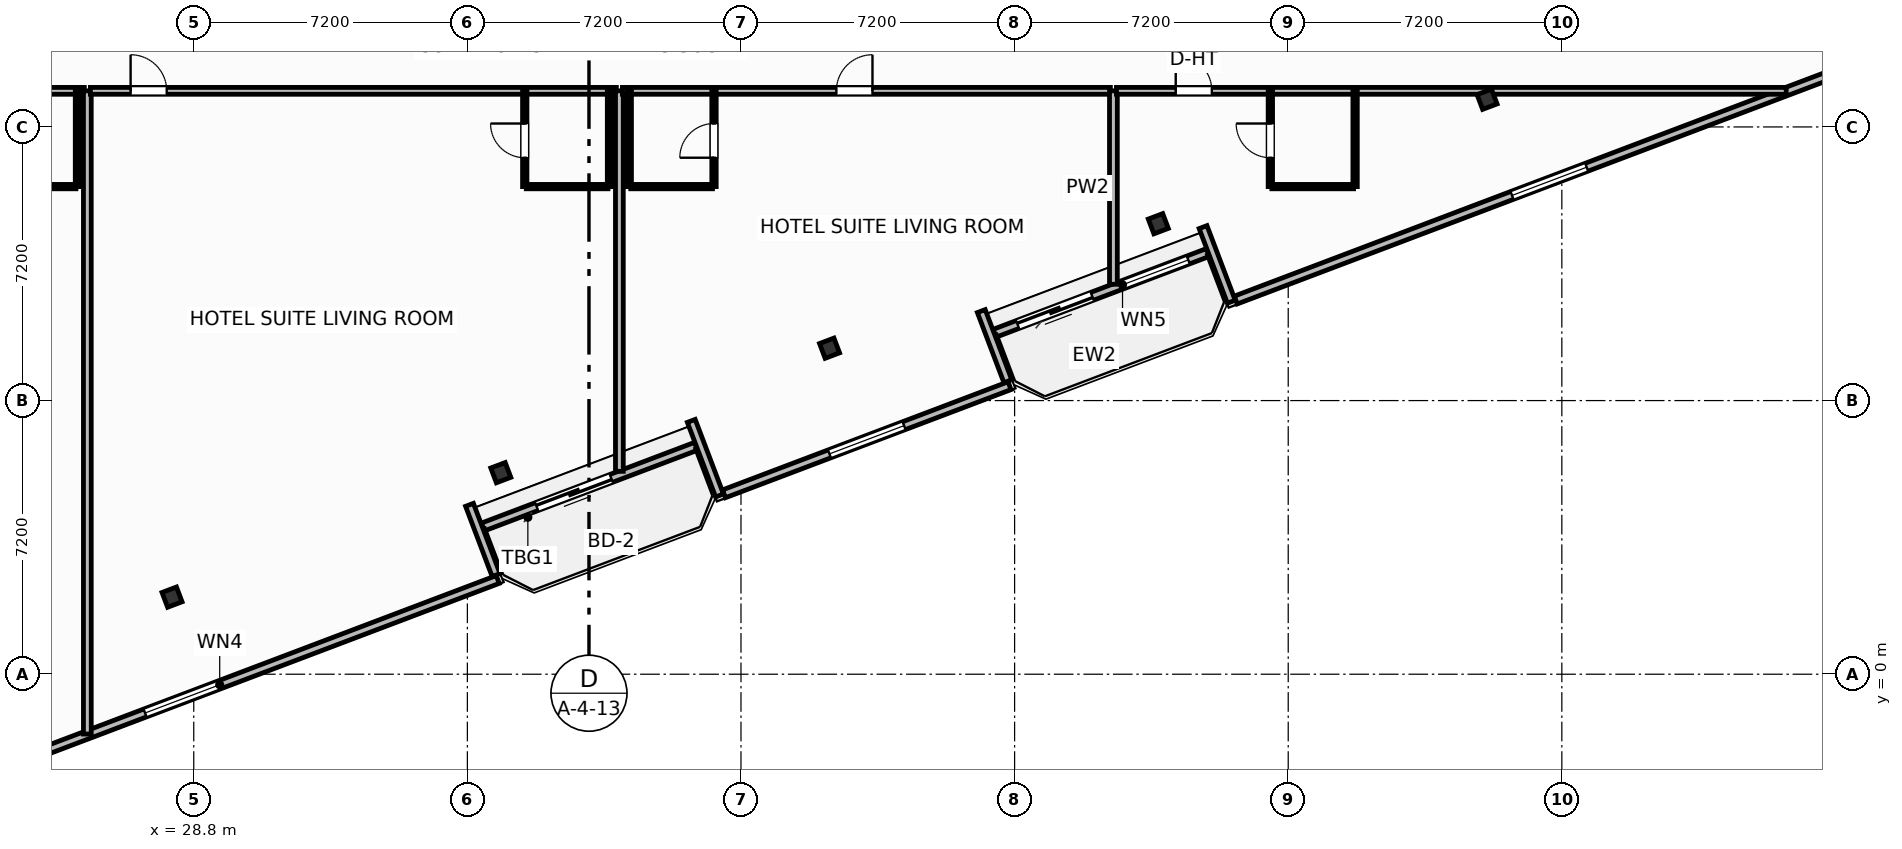
"""IFC4 building model, lengths in metres.
Left out: names, types, materials, properties, quantities, classifications, styles, units other than length and angle.
Written with IfcOpenShell. Run it as: python <this file> out.ifc"""

import sys

from ifc_helpers import new_model, si_unit, direction, frame, frame_2d, origin, origin_2d, place, context, subcontext, project, spatial, rectangle, i_section, extrude, element, fill, save


model = new_model("IFC4")
c1 = context("Model", 3, precision=1e-05, world=origin(), true_north=direction((0.0, 1.0)))
c2 = subcontext(c1, "Body", "Model", "MODEL_VIEW")
j1 = project(units=[si_unit("LENGTHUNIT", "METRE"), si_unit("PLANEANGLEUNIT", "RADIAN")], contexts=[c1])
p1 = place(None, origin())
s1 = spatial("IfcSite", under=j1, at=p1, CompositionType="ELEMENT")
p2 = place(p1, origin())
s2 = spatial("IfcBuilding", under=s1, at=p2, CompositionType="ELEMENT")
p3 = place(p2, frame((0.0, 0.0, 249.7)))
s3 = spatial("IfcBuildingStorey", under=s2, at=p3, CompositionType="ELEMENT", Elevation=249.7)
for number, where, z_axis, x_axis in (
    (1, (28.229, 2.028, 0.0), (0.0, 0.0, 1.0), (0.935, 0.354, 0.0)),
    (2, (36.88, 5.303, 0.0), (0.0, 0.0, 1.0), (0.935, 0.354, 0.0)),
    (3, (45.531, 8.578, 0.0), (0.0, 0.0, 1.0), (0.935, 0.354, 0.0)),
    (4, (54.181, 11.853, 0.0), (0.0, 0.0, 1.0), (0.935, 0.354, 0.0)),
    (5, (62.832, 15.128, 0.0), (0.0, 0.0, 1.0), (0.935, 0.354, 0.0)),
):
    element("IfcColumn", number, at=place(p3, frame(where, z_axis=z_axis, x_axis=x_axis)), inside=s3, PredefinedType="COLUMN", context=c2, shape_type="SweptSolid", body=[
        extrude(i_section(OverallWidth=0.406, OverallDepth=0.416, WebThickness=0.03, FlangeThickness=0.048, FilletRadius=0.025, at=origin_2d()), origin(), (0.0, 0.0, 1.0), 3.7),
    ])
p4 = place(p3, frame((42.017, 5.997, 0.0), z_axis=(0.0, 0.0, 1.0), x_axis=(-0.9352192676, -0.354069091436, 0.0)))
e6 = element("IfcWall", 6, at=p4, inside=s3, PredefinedType="SOLIDWALL", context=c2, shape_type="SweptSolid", body=[
    extrude(rectangle(XDim=6.0, YDim=0.22, at=frame_2d((3.0, 0.0))), origin(), (0.0, 0.0, 1.0), 2.66),
])
p5 = place(p4, frame((2.384, 0.0, 0.0)))
e7 = element("IfcOpeningElement", 7, at=p5, cuts=e6, PredefinedType="OPENING", context=c2, shape_type="SweptSolid", body=[
    extrude(rectangle(XDim=2.1, YDim=2.3, at=frame_2d((1.05, 1.15))), frame((0.0, 0.12, 0.0), z_axis=(0.0, -1.0, 0.0), x_axis=(1.0, 0.0, 0.0)), (0.0, 0.0, 1.0), 0.24),
])
p6 = place(p3, frame((55.484, 11.095, 0.0), z_axis=(0.0, 0.0, 1.0), x_axis=(-0.935227640088, -0.354046976001, 0.0)))
e8 = element("IfcWall", 8, at=p6, inside=s3, PredefinedType="SOLIDWALL", context=c2, shape_type="SweptSolid", body=[
    extrude(rectangle(XDim=6.0, YDim=0.22, at=frame_2d((3.0, 0.0))), origin(), (0.0, 0.0, 1.0), 2.66),
])
p7 = place(p6, frame((3.252, 0.0, 0.0)))
e9 = element("IfcOpeningElement", 9, at=p7, cuts=e8, PredefinedType="OPENING", context=c2, shape_type="SweptSolid", body=[
    extrude(rectangle(XDim=2.1, YDim=2.3, at=frame_2d((1.05, 1.15))), frame((0.0, 0.12, 0.0), z_axis=(0.0, -1.0, 0.0), x_axis=(1.0, 0.0, 0.0)), (0.0, 0.0, 1.0), 0.24),
])
p8 = place(p6, frame((0.55, 0.0, 0.75)))
e10 = element("IfcOpeningElement", 10, at=p8, cuts=e8, PredefinedType="OPENING", context=c2, shape_type="SweptSolid", body=[
    extrude(rectangle(XDim=1.85, YDim=1.75, at=frame_2d((0.925, 0.875))), frame((0.0, 0.12, 0.0), z_axis=(0.0, -1.0, 0.0), x_axis=(1.0, 0.0, 0.0)), (0.0, 0.0, 1.0), 0.24),
])
p9 = place(p3, frame((20.202, -3.791, 0.0), z_axis=(0.0, 0.0, 1.0), x_axis=(0.935225574232, 0.354052432984, 0.0)))
e11 = element("IfcWall", 11, at=p9, inside=s3, PredefinedType="SOLIDWALL", context=c2, shape_type="SweptSolid", body=[
    extrude(rectangle(XDim=17.747, YDim=0.22, at=frame_2d((8.874, 0.0))), origin(), (0.0, 0.0, 1.0), 2.66),
])
p10 = place(p9, frame((7.823, 0.0, 0.8)))
e12 = element("IfcOpeningElement", 12, at=p10, cuts=e11, PredefinedType="OPENING", context=c2, shape_type="SweptSolid", body=[
    extrude(rectangle(XDim=2.1, YDim=1.75, at=frame_2d((1.05, 0.875))), frame((0.0, 0.12, 0.0), z_axis=(0.0, -1.0, 0.0), x_axis=(1.0, 0.0, 0.0)), (0.0, 0.0, 1.0), 0.24),
])
p11 = place(p3, frame((36.755, 2.61, 0.0), z_axis=(0.0, 0.0, 1.0), x_axis=(-0.354020680661, 0.935237594232, 0.0)))
e13 = element("IfcWall", 13, at=p11, inside=s3, PredefinedType="SOLIDWALL", context=c2, shape_type="SweptSolid", body=[
    extrude(rectangle(XDim=1.975, YDim=0.22, at=frame_2d((0.988, 0.0))), origin(), (0.0, 0.0, 1.0), 2.66),
])
p12 = place(p3, frame((41.892, 6.666, 0.0), z_axis=(0.0, 0.0, 1.0), x_axis=(0.354128469405, -0.935196785258, 0.0)))
e14 = element("IfcWall", 14, at=p12, inside=s3, PredefinedType="SOLIDWALL", context=c2, shape_type="SweptSolid", body=[
    extrude(rectangle(XDim=2.1, YDim=0.22, at=frame_2d((1.05, 0.0))), origin(), (0.0, 0.0, 1.0), 2.66),
])
p13 = place(p3, frame((42.752, 4.746, 0.0), z_axis=(0.0, 0.0, 1.0), x_axis=(0.935216926991, 0.354075273733, 0.0)))
e15 = element("IfcWall", 15, at=p13, inside=s3, PredefinedType="SOLIDWALL", context=c2, shape_type="SweptSolid", body=[
    extrude(rectangle(XDim=8.035, YDim=0.22, at=frame_2d((4.018, 0.0))), origin(), (0.0, 0.0, 1.0), 2.66),
])
p14 = place(p13, frame((2.968, 0.0, 0.8)))
e16 = element("IfcOpeningElement", 16, at=p14, cuts=e15, PredefinedType="OPENING", context=c2, shape_type="SweptSolid", body=[
    extrude(rectangle(XDim=2.1, YDim=1.75, at=frame_2d((1.05, 0.875))), frame((0.0, 0.12, 0.0), z_axis=(0.0, -1.0, 0.0), x_axis=(1.0, 0.0, 0.0)), (0.0, 0.0, 1.0), 0.24),
])
p15 = place(p3, frame((50.223, 7.708, 0.0), z_axis=(0.0, 0.0, 1.0), x_axis=(-0.354020680661, 0.935237594232, 0.0)))
e17 = element("IfcWall", 17, at=p15, inside=s3, PredefinedType="SOLIDWALL", context=c2, shape_type="SweptSolid", body=[
    extrude(rectangle(XDim=1.975, YDim=0.22, at=frame_2d((0.988, 0.0))), origin(), (0.0, 0.0, 1.0), 2.66),
])
p16 = place(p3, frame((55.359, 11.764, 0.0), z_axis=(0.0, 0.0, 1.0), x_axis=(0.354026782794, -0.935235284334, 0.0)))
e18 = element("IfcWall", 18, at=p16, inside=s3, PredefinedType="SOLIDWALL", context=c2, shape_type="SweptSolid", body=[
    extrude(rectangle(XDim=2.1, YDim=0.22, at=frame_2d((1.05, 0.0))), origin(), (0.0, 0.0, 1.0), 2.66),
])
p17 = place(p3, frame((56.219, 9.845, 0.0), z_axis=(0.0, 0.0, 1.0), x_axis=(0.935225601791, 0.354052360188, 0.0)))
e19 = element("IfcWall", 19, at=p17, inside=s3, PredefinedType="SOLIDWALL", context=c2, shape_type="SweptSolid", body=[
    extrude(rectangle(XDim=17.647, YDim=0.22, at=frame_2d((8.824, 0.0))), origin(), (0.0, 0.0, 1.0), 2.66),
])
p18 = place(p17, frame((7.774, 0.0, 0.8)))
e20 = element("IfcOpeningElement", 20, at=p18, cuts=e19, PredefinedType="OPENING", context=c2, shape_type="SweptSolid", body=[
    extrude(rectangle(XDim=2.1, YDim=1.75, at=frame_2d((1.05, 0.875))), frame((0.0, 0.12, 0.0), z_axis=(0.0, -1.0, 0.0), x_axis=(1.0, 0.0, 0.0)), (0.0, 0.0, 1.0), 0.24),
])
p19 = place(p3, frame((7.764, 15.35, 0.0), z_axis=(0.0, 0.0, 1.0), x_axis=(1.0, 0.0, 0.0)))
e21 = element("IfcWall", 21, at=p19, inside=s3, PredefinedType="PARTITIONING", context=c2, shape_type="SweptSolid", body=[
    extrude(rectangle(XDim=18.156, YDim=0.18, at=frame_2d((9.078, 0.0))), origin(), (0.0, 0.0, 1.0), 3.38),
])
p20 = place(p19, frame((11.617, 0.0, 0.0)))
e22 = element("IfcOpeningElement", 22, at=p20, cuts=e21, PredefinedType="OPENING", context=c2, shape_type="SweptSolid", body=[
    extrude(rectangle(XDim=0.95, YDim=2.15, at=frame_2d((0.475, 1.075))), frame((0.0, 0.1, 0.0), z_axis=(0.0, -1.0, 0.0), x_axis=(1.0, 0.0, 0.0)), (0.0, 0.0, 1.0), 0.2),
])
p21 = place(p3, frame((23.55, 12.83, 0.0), z_axis=(0.0, 0.0, 1.0), x_axis=(1.0, 0.0, 0.0)))
e23 = element("IfcWall", 23, at=p21, inside=s3, PredefinedType="PARTITIONING", context=c2, shape_type="SweptSolid", body=[
    extrude(rectangle(XDim=2.15, YDim=0.115, at=frame_2d((1.075, 0.0))), origin(), (0.0, 0.0, 1.0), 3.38),
])
p22 = place(p3, frame((25.74, 12.83, 0.0), z_axis=(0.0, 0.0, 1.0), x_axis=(0.0, 1.0, 0.0)))
e24 = element("IfcWall", 24, at=p22, inside=s3, PredefinedType="PARTITIONING", context=c2, shape_type="SweptSolid", body=[
    extrude(rectangle(XDim=2.52, YDim=0.115, at=frame_2d((1.26, 0.0))), origin(), (0.0, 0.0, 1.0), 1.165),
])
p23 = place(p3, frame((26.0, -1.574, 0.0), z_axis=(0.0, 0.0, 1.0), x_axis=(0.0, 1.0, 0.0)))
e25 = element("IfcWall", 25, at=p23, inside=s3, PredefinedType="PARTITIONING", context=c2, shape_type="SweptSolid", body=[
    extrude(rectangle(XDim=16.925, YDim=0.205, at=frame_2d((8.462, 0.0))), origin(), (0.0, 0.0, 1.0), 1.165),
])
p24 = place(p3, frame((26.08, 15.35, 0.0), z_axis=(0.0, 0.0, 1.0), x_axis=(1.0, 0.0, 0.0)))
e26 = element("IfcWall", 26, at=p24, inside=s3, PredefinedType="PARTITIONING", context=c2, shape_type="SweptSolid", body=[
    extrude(rectangle(XDim=13.84, YDim=0.18, at=frame_2d((6.92, 0.0))), origin(), (0.0, 0.0, 1.0), 3.38),
])
p25 = place(p24, frame((1.058, 0.0, 0.0)))
e27 = element("IfcOpeningElement", 27, at=p25, cuts=e26, PredefinedType="OPENING", context=c2, shape_type="SweptSolid", body=[
    extrude(rectangle(XDim=0.95, YDim=2.15, at=frame_2d((0.475, 1.075))), frame((0.0, 0.1, 0.0), z_axis=(0.0, -1.0, 0.0), x_axis=(1.0, 0.0, 0.0)), (0.0, 0.0, 1.0), 0.2),
])
p26 = place(p3, frame((37.55, 12.83, 0.0), z_axis=(0.0, 0.0, 1.0), x_axis=(1.0, 0.0, 0.0)))
e28 = element("IfcWall", 28, at=p26, inside=s3, PredefinedType="PARTITIONING", context=c2, shape_type="SweptSolid", body=[
    extrude(rectangle(XDim=2.15, YDim=0.115, at=frame_2d((1.075, 0.0))), origin(), (0.0, 0.0, 1.0), 3.38),
])
p27 = place(p3, frame((37.51, 12.83, 0.0), z_axis=(0.0, 0.0, 1.0), x_axis=(0.0, 1.0, 0.0)))
e29 = element("IfcWall", 29, at=p27, inside=s3, PredefinedType="PARTITIONING", context=c2, shape_type="SweptSolid", body=[
    extrude(rectangle(XDim=2.52, YDim=0.115, at=frame_2d((1.26, 0.0))), origin(), (0.0, 0.0, 1.0), 3.38),
])
p28 = place(p27, frame((0.76, 0.0, 0.0)))
e30 = element("IfcOpeningElement", 30, at=p28, cuts=e29, PredefinedType="OPENING", context=c2, shape_type="SweptSolid", body=[
    extrude(rectangle(XDim=0.9, YDim=2.05, at=frame_2d((0.45, 1.025))), frame((0.0, 0.067, 0.0), z_axis=(0.0, -1.0, 0.0), x_axis=(1.0, 0.0, 0.0)), (0.0, 0.0, 1.0), 0.135),
])
p29 = place(p3, frame((39.74, 12.83, 0.0), z_axis=(0.0, 0.0, 1.0), x_axis=(0.0, 1.0, 0.0)))
e31 = element("IfcWall", 31, at=p29, inside=s3, PredefinedType="PARTITIONING", context=c2, shape_type="SweptSolid", body=[
    extrude(rectangle(XDim=2.52, YDim=0.115, at=frame_2d((1.26, 0.0))), origin(), (0.0, 0.0, 1.0), 3.38),
])
p30 = place(p3, frame((40.0, 5.338, 0.0), z_axis=(0.0, 0.0, 1.0), x_axis=(0.0, 1.0, 0.0)))
e32 = element("IfcWall", 32, at=p30, inside=s3, PredefinedType="PARTITIONING", context=c2, shape_type="SweptSolid", body=[
    extrude(rectangle(XDim=10.012, YDim=0.205, at=frame_2d((5.006, 0.0))), origin(), (0.0, 0.0, 1.0), 3.38),
])
p31 = place(p3, frame((40.08, 15.35, 0.0), z_axis=(0.0, 0.0, 1.0), x_axis=(1.0, 0.0, 0.0)))
e33 = element("IfcWall", 33, at=p31, inside=s3, PredefinedType="PARTITIONING", context=c2, shape_type="SweptSolid", body=[
    extrude(rectangle(XDim=12.84, YDim=0.18, at=frame_2d((6.42, 0.0))), origin(), (0.0, 0.0, 1.0), 3.38),
])
p32 = place(p31, frame((5.63, 0.0, 0.0)))
e34 = element("IfcOpeningElement", 34, at=p32, cuts=e33, PredefinedType="OPENING", context=c2, shape_type="SweptSolid", body=[
    extrude(rectangle(XDim=0.95, YDim=2.15, at=frame_2d((0.475, 1.075))), frame((0.0, 0.1, 0.0), z_axis=(0.0, -1.0, 0.0), x_axis=(1.0, 0.0, 0.0)), (0.0, 0.0, 1.0), 0.2),
])
p33 = place(p3, frame((40.3, 12.83, 0.0), z_axis=(0.0, 0.0, 1.0), x_axis=(1.0, 0.0, 0.0)))
e35 = element("IfcWall", 35, at=p33, inside=s3, PredefinedType="PARTITIONING", context=c2, shape_type="SweptSolid", body=[
    extrude(rectangle(XDim=2.15, YDim=0.115, at=frame_2d((1.075, 0.0))), origin(), (0.0, 0.0, 1.0), 3.38),
])
p34 = place(p3, frame((42.49, 12.83, 0.0), z_axis=(0.0, 0.0, 1.0), x_axis=(0.0, 1.0, 0.0)))
e36 = element("IfcWall", 36, at=p34, inside=s3, PredefinedType="PARTITIONING", context=c2, shape_type="SweptSolid", body=[
    extrude(rectangle(XDim=2.52, YDim=0.115, at=frame_2d((1.26, 0.0))), origin(), (0.0, 0.0, 1.0), 3.38),
])
p35 = place(p34, frame((0.76, 0.0, 0.0)))
e37 = element("IfcOpeningElement", 37, at=p35, cuts=e36, PredefinedType="OPENING", context=c2, shape_type="SweptSolid", body=[
    extrude(rectangle(XDim=0.9, YDim=2.05, at=frame_2d((0.45, 1.025))), frame((0.0, 0.067, 0.0), z_axis=(0.0, -1.0, 0.0), x_axis=(1.0, 0.0, 0.0)), (0.0, 0.0, 1.0), 0.135),
])
p36 = place(p3, frame((40.26, 12.83, 0.0), z_axis=(0.0, 0.0, 1.0), x_axis=(0.0, 1.0, 0.0)))
e38 = element("IfcWall", 38, at=p36, inside=s3, PredefinedType="PARTITIONING", context=c2, shape_type="SweptSolid", body=[
    extrude(rectangle(XDim=2.52, YDim=0.115, at=frame_2d((1.26, 0.0))), origin(), (0.0, 0.0, 1.0), 3.38),
])
p37 = place(p3, frame((53.0, 10.26, 0.0), z_axis=(0.0, 0.0, 1.0), x_axis=(0.0, 1.0, 0.0)))
e39 = element("IfcWall", 39, at=p37, inside=s3, PredefinedType="PARTITIONING", context=c2, shape_type="SweptSolid", body=[
    extrude(rectangle(XDim=5.09, YDim=0.205, at=frame_2d((2.545, 0.0))), origin(), (0.0, 0.0, 1.0), 3.38),
])
p38 = place(p3, frame((53.08, 15.35, 0.0), z_axis=(0.0, 0.0, 1.0), x_axis=(1.0, 0.0, 0.0)))
e40 = element("IfcWall", 40, at=p38, inside=s3, PredefinedType="PARTITIONING", context=c2, shape_type="SweptSolid", body=[
    extrude(rectangle(XDim=17.624, YDim=0.18, at=frame_2d((8.812, 0.0))), origin(), (0.0, 0.0, 1.0), 3.38),
])
p39 = place(p38, frame((1.56, 0.0, 0.0)))
e41 = element("IfcOpeningElement", 41, at=p39, cuts=e40, PredefinedType="OPENING", context=c2, shape_type="SweptSolid", body=[
    extrude(rectangle(XDim=0.95, YDim=2.15, at=frame_2d((0.475, 1.075))), frame((0.0, 0.1, 0.0), z_axis=(0.0, -1.0, 0.0), x_axis=(1.0, 0.0, 0.0)), (0.0, 0.0, 1.0), 0.2),
])
p40 = place(p3, frame((57.17, 12.83, 0.0), z_axis=(0.0, 0.0, 1.0), x_axis=(1.0, 0.0, 0.0)))
e42 = element("IfcWall", 42, at=p40, inside=s3, PredefinedType="PARTITIONING", context=c2, shape_type="SweptSolid", body=[
    extrude(rectangle(XDim=2.15, YDim=0.115, at=frame_2d((1.075, 0.0))), origin(), (0.0, 0.0, 1.0), 3.38),
])
p41 = place(p3, frame((57.13, 12.83, 0.0), z_axis=(0.0, 0.0, 1.0), x_axis=(0.0, 1.0, 0.0)))
e43 = element("IfcWall", 43, at=p41, inside=s3, PredefinedType="PARTITIONING", context=c2, shape_type="SweptSolid", body=[
    extrude(rectangle(XDim=2.52, YDim=0.115, at=frame_2d((1.26, 0.0))), origin(), (0.0, 0.0, 1.0), 3.38),
])
p42 = place(p41, frame((0.76, 0.0, 0.0)))
e44 = element("IfcOpeningElement", 44, at=p42, cuts=e43, PredefinedType="OPENING", context=c2, shape_type="SweptSolid", body=[
    extrude(rectangle(XDim=0.9, YDim=2.05, at=frame_2d((0.45, 1.025))), frame((0.0, 0.067, 0.0), z_axis=(0.0, -1.0, 0.0), x_axis=(1.0, 0.0, 0.0)), (0.0, 0.0, 1.0), 0.135),
])
p43 = place(p3, frame((59.36, 12.83, 0.0), z_axis=(0.0, 0.0, 1.0), x_axis=(0.0, 1.0, 0.0)))
e45 = element("IfcWall", 45, at=p43, inside=s3, PredefinedType="PARTITIONING", context=c2, shape_type="SweptSolid", body=[
    extrude(rectangle(XDim=2.52, YDim=0.115, at=frame_2d((1.26, 0.0))), origin(), (0.0, 0.0, 1.0), 3.38),
])
p44 = place(p5, origin())
e46 = element("IfcDoor", 46, at=p44, inside=s3, OperationType="SLIDING_TO_LEFT", PredefinedType="DOOR", context=c2, shape_type="SweptSolid", body=[
    extrude(rectangle(XDim=2.1, YDim=2.3, at=frame_2d((1.05, 1.15))), frame((0.0, 0.025, 0.0), z_axis=(0.0, -1.0, 0.0), x_axis=(1.0, 0.0, 0.0)), (0.0, 0.0, 1.0), 0.05),
])
fill(e7, e46)
p45 = place(p7, origin())
e47 = element("IfcDoor", 47, at=p45, inside=s3, OperationType="SLIDING_TO_LEFT", PredefinedType="DOOR", context=c2, shape_type="SweptSolid", body=[
    extrude(rectangle(XDim=2.1, YDim=2.3, at=frame_2d((1.05, 1.15))), frame((0.0, 0.025, 0.0), z_axis=(0.0, -1.0, 0.0), x_axis=(1.0, 0.0, 0.0)), (0.0, 0.0, 1.0), 0.05),
])
fill(e9, e47)
p46 = place(p8, origin())
e48 = element("IfcWindow", 48, at=p46, inside=s3, PartitioningType="SINGLE_PANEL", PredefinedType="WINDOW", context=c2, shape_type="SweptSolid", body=[
    extrude(rectangle(XDim=1.85, YDim=1.75, at=frame_2d((0.925, 0.875))), frame((0.0, 0.03, 0.0), z_axis=(0.0, -1.0, 0.0), x_axis=(1.0, 0.0, 0.0)), (0.0, 0.0, 1.0), 0.06),
])
fill(e10, e48)
p47 = place(p10, origin())
e49 = element("IfcWindow", 49, at=p47, inside=s3, PartitioningType="SINGLE_PANEL", PredefinedType="WINDOW", context=c2, shape_type="SweptSolid", body=[
    extrude(rectangle(XDim=2.1, YDim=1.75, at=frame_2d((1.05, 0.875))), frame((0.0, 0.03, 0.0), z_axis=(0.0, -1.0, 0.0), x_axis=(1.0, 0.0, 0.0)), (0.0, 0.0, 1.0), 0.06),
])
fill(e12, e49)
p48 = place(p14, origin())
e50 = element("IfcWindow", 50, at=p48, inside=s3, PartitioningType="SINGLE_PANEL", PredefinedType="WINDOW", context=c2, shape_type="SweptSolid", body=[
    extrude(rectangle(XDim=2.1, YDim=1.75, at=frame_2d((1.05, 0.875))), frame((0.0, 0.03, 0.0), z_axis=(0.0, -1.0, 0.0), x_axis=(1.0, 0.0, 0.0)), (0.0, 0.0, 1.0), 0.06),
])
fill(e16, e50)
p49 = place(p18, origin())
e51 = element("IfcWindow", 51, at=p49, inside=s3, PartitioningType="SINGLE_PANEL", PredefinedType="WINDOW", context=c2, shape_type="SweptSolid", body=[
    extrude(rectangle(XDim=2.1, YDim=1.75, at=frame_2d((1.05, 0.875))), frame((0.0, 0.03, 0.0), z_axis=(0.0, -1.0, 0.0), x_axis=(1.0, 0.0, 0.0)), (0.0, 0.0, 1.0), 0.06),
])
fill(e20, e51)
p50 = place(p25, origin())
e52 = element("IfcDoor", 52, at=p50, inside=s3, OperationType="SINGLE_SWING_LEFT", PredefinedType="DOOR", context=c2, shape_type="SweptSolid", body=[
    extrude(rectangle(XDim=0.95, YDim=2.15, at=frame_2d((0.475, 1.075))), frame((0.0, 0.025, 0.0), z_axis=(0.0, -1.0, 0.0), x_axis=(1.0, 0.0, 0.0)), (0.0, 0.0, 1.0), 0.05),
])
fill(e27, e52)
p51 = place(p28, origin())
e53 = element("IfcDoor", 53, at=p51, inside=s3, OperationType="SINGLE_SWING_RIGHT", PredefinedType="DOOR", context=c2, shape_type="SweptSolid", body=[
    extrude(rectangle(XDim=0.9, YDim=2.05, at=frame_2d((0.45, 1.025))), frame((0.0, 0.025, 0.0), z_axis=(0.0, -1.0, 0.0), x_axis=(1.0, 0.0, 0.0)), (0.0, 0.0, 1.0), 0.05),
])
fill(e30, e53)
p52 = place(p32, origin())
e54 = element("IfcDoor", 54, at=p52, inside=s3, OperationType="SINGLE_SWING_RIGHT", PredefinedType="DOOR", context=c2, shape_type="SweptSolid", body=[
    extrude(rectangle(XDim=0.95, YDim=2.15, at=frame_2d((0.475, 1.075))), frame((0.0, 0.025, 0.0), z_axis=(0.0, -1.0, 0.0), x_axis=(1.0, 0.0, 0.0)), (0.0, 0.0, 1.0), 0.05),
])
fill(e34, e54)
p53 = place(p35, origin())
e55 = element("IfcDoor", 55, at=p53, inside=s3, OperationType="SINGLE_SWING_LEFT", PredefinedType="DOOR", context=c2, shape_type="SweptSolid", body=[
    extrude(rectangle(XDim=0.9, YDim=2.05, at=frame_2d((0.45, 1.025))), frame((0.0, 0.025, 0.0), z_axis=(0.0, -1.0, 0.0), x_axis=(1.0, 0.0, 0.0)), (0.0, 0.0, 1.0), 0.05),
])
fill(e37, e55)
p54 = place(p39, origin())
e56 = element("IfcDoor", 56, at=p54, inside=s3, OperationType="SINGLE_SWING_LEFT", PredefinedType="DOOR", context=c2, shape_type="SweptSolid", body=[
    extrude(rectangle(XDim=0.95, YDim=2.15, at=frame_2d((0.475, 1.075))), frame((0.0, 0.025, 0.0), z_axis=(0.0, -1.0, 0.0), x_axis=(1.0, 0.0, 0.0)), (0.0, 0.0, 1.0), 0.05),
])
fill(e41, e56)
p55 = place(p42, origin())
e57 = element("IfcDoor", 57, at=p55, inside=s3, OperationType="SINGLE_SWING_RIGHT", PredefinedType="DOOR", context=c2, shape_type="SweptSolid", body=[
    extrude(rectangle(XDim=0.9, YDim=2.05, at=frame_2d((0.45, 1.025))), frame((0.0, 0.025, 0.0), z_axis=(0.0, -1.0, 0.0), x_axis=(1.0, 0.0, 0.0)), (0.0, 0.0, 1.0), 0.05),
])
fill(e44, e57)
save(model, sys.argv[1])
